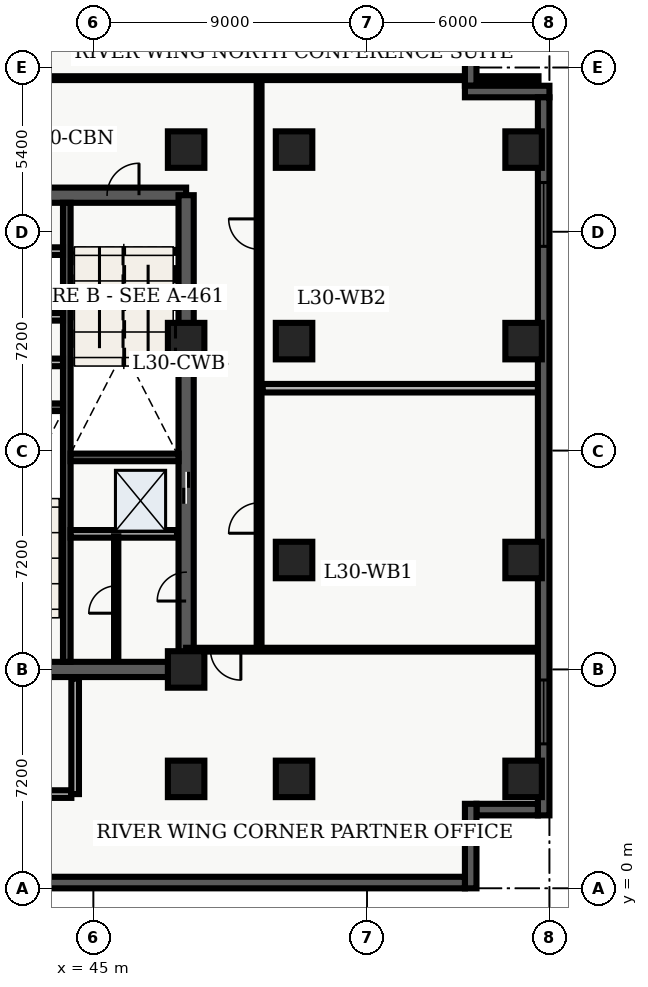
"""IFC4 building model, lengths in metres.
Left out: names, types, materials, properties, quantities, classifications, styles, units other than length and angle.
Written with IfcOpenShell. Run it as: python <this file> out.ifc"""

import sys

from ifc_helpers import new_model, entity, si_unit, converted_unit, direction, frame, origin_with_axes, origin_2d_with_axis, place, context, subcontext, project, spatial, polyline, rectangle, outline, extrude, element, fill, save


model = new_model("IFC4")
c1 = context("Model", 3, precision=1e-05, world=origin_with_axes(), true_north=direction((0.0, 1.0)))
c2 = subcontext(c1, "Body", "Model", "MODEL_VIEW")
j1 = project(units=[si_unit("LENGTHUNIT", "METRE"), converted_unit("PLANEANGLEUNIT", "DEGREE", entity("IfcPlaneAngleMeasure", 0.017), si_unit("PLANEANGLEUNIT", "RADIAN"), dimensions=[0, 0, 0, 0, 0, 0, 0])], contexts=[c1])
p1 = place(None, origin_with_axes())
s1 = spatial("IfcSite", under=j1, at=p1, CompositionType="ELEMENT")
p2 = place(p1, origin_with_axes())
s2 = spatial("IfcBuilding", under=s1, at=p2, CompositionType="ELEMENT")
p3 = place(p2, frame((0.0, 0.0, 124.2), z_axis=(0.0, 0.0, 1.0), x_axis=(1.0, 0.0, 0.0)))
s3 = spatial("IfcBuildingStorey", under=s2, at=p3, CompositionType="ELEMENT", Elevation=124.2)
p4 = place(p3, frame((40.2, 7.2, 0.0), z_axis=(0.0, 0.0, 1.0), x_axis=(1.0, 0.0, 0.0)))
e1 = element("IfcWall", 1, at=p4, inside=s3, PredefinedType="SHEAR", context=c2, shape_type="SweptSolid", body=[
    extrude(outline(polyline([(0.0, -0.25), (7.85, -0.25), (7.85, 0.25), (0.0, 0.25), (0.0, -0.25)])), origin_with_axes(), (0.0, 0.0, 1.0), 4.56),
])
p5 = place(p4, frame((2.175, 0.0, 0.0), z_axis=(0.0, 0.0, 1.0), x_axis=(1.0, 0.0, 0.0)))
e2 = element("IfcOpeningElement", 2, at=p5, cuts=e1, PredefinedType="OPENING", context=c2, shape_type="SweptSolid", body=[
    extrude(rectangle(XDim=1.05, YDim=0.52, at=origin_2d_with_axis()), origin_with_axes(), (0.0, 0.0, 1.0), 2.15),
])
p6 = place(p3, frame((40.2, 22.8, 0.0), z_axis=(0.0, 0.0, 1.0), x_axis=(1.0, 0.0, 0.0)))
e3 = element("IfcWall", 3, at=p6, inside=s3, PredefinedType="SHEAR", context=c2, shape_type="SweptSolid", body=[
    extrude(outline(polyline([(0.0, -0.25), (7.85, -0.25), (7.85, 0.25), (0.0, 0.25), (0.0, -0.25)])), origin_with_axes(), (0.0, 0.0, 1.0), 4.56),
])
p7 = place(p6, frame((5.775, 0.0, 0.0), z_axis=(0.0, 0.0, 1.0), x_axis=(1.0, 0.0, 0.0)))
e4 = element("IfcOpeningElement", 4, at=p7, cuts=e3, PredefinedType="OPENING", context=c2, shape_type="SweptSolid", body=[
    extrude(rectangle(XDim=1.05, YDim=0.52, at=origin_2d_with_axis()), origin_with_axes(), (0.0, 0.0, 1.0), 2.15),
])
p8 = place(p3, frame((48.05, 7.2, 0.0), z_axis=(0.0, 0.0, 1.0), x_axis=(0.0, 1.0, 0.0)))
e5 = element("IfcWall", 5, at=p8, inside=s3, PredefinedType="SHEAR", context=c2, shape_type="SweptSolid", body=[
    extrude(outline(polyline([(0.0, -0.25), (15.6, -0.25), (15.6, 0.25), (0.0, 0.25), (0.0, -0.25)])), origin_with_axes(), (0.0, 0.0, 1.0), 4.56),
])
p9 = place(p8, frame((5.975, 0.0, 0.0), z_axis=(0.0, 0.0, 1.0), x_axis=(1.0, 0.0, 0.0)))
e6 = element("IfcOpeningElement", 6, at=p9, cuts=e5, PredefinedType="OPENING", context=c2, shape_type="SweptSolid", body=[
    extrude(rectangle(XDim=1.05, YDim=0.52, at=origin_2d_with_axis()), origin_with_axes(), (0.0, 0.0, 1.0), 2.15),
])
p10 = place(p8, frame((2.725, 0.0, 0.0), z_axis=(0.0, 0.0, 1.0), x_axis=(1.0, 0.0, 0.0)))
e7 = element("IfcOpeningElement", 7, at=p10, cuts=e5, PredefinedType="OPENING", context=c2, shape_type="SweptSolid", body=[
    extrude(rectangle(XDim=0.95, YDim=0.52, at=origin_2d_with_axis()), origin_with_axes(), (0.0, 0.0, 1.0), 2.15),
])
p11 = place(p3, frame((44.125, 7.45, 0.0), z_axis=(0.0, 0.0, 1.0), x_axis=(0.0, 1.0, 0.0)))
e8 = element("IfcWall", 8, at=p11, inside=s3, PredefinedType="SHEAR", context=c2, shape_type="SweptSolid", body=[
    extrude(outline(polyline([(0.0, -0.125), (15.1, -0.125), (15.1, 0.125), (0.0, 0.125), (0.0, -0.125)])), origin_with_axes(), (0.0, 0.0, 1.0), 4.56),
])
for number, where, z_axis, x_axis in (
    (9, (40.45, 15.825, 0.0), (0.0, 0.0, 1.0), (1.0, 0.0, 0.0)),
    (10, (44.25, 14.175, 0.0), (0.0, 0.0, 1.0), (1.0, 0.0, 0.0)),
):
    element("IfcWall", number, at=place(p3, frame(where, z_axis=z_axis, x_axis=x_axis)), inside=s3, PredefinedType="SHEAR", context=c2, shape_type="SweptSolid", body=[
        extrude(outline(polyline([(0.0, -0.125), (3.55, -0.125), (3.55, 0.125), (0.0, 0.125), (0.0, -0.125)])), origin_with_axes(), (0.0, 0.0, 1.0), 4.56),
    ])
p12 = place(p3, frame((40.5, 17.3, 0.0), z_axis=(0.0, 0.0, 1.0), x_axis=(1.0, 0.0, 0.0)))
e11 = element("IfcWall", 11, at=p12, inside=s3, PredefinedType="SOLIDWALL", context=c2, shape_type="SweptSolid", body=[
    extrude(outline(polyline([(0.0, -0.125), (3.5, -0.125), (3.5, 0.125), (0.0, 0.125), (0.0, -0.125)])), origin_with_axes(), (0.0, 0.0, 1.0), 3.6),
])
p13 = place(p12, frame((2.4, 0.0, 0.0), z_axis=(0.0, 0.0, 1.0), x_axis=(1.0, 0.0, 0.0)))
e12 = element("IfcOpeningElement", 12, at=p13, cuts=e11, PredefinedType="OPENING", context=c2, shape_type="SweptSolid", body=[
    extrude(rectangle(XDim=0.9, YDim=0.27, at=origin_2d_with_axis()), origin_with_axes(), (0.0, 0.0, 1.0), 2.15),
])
p14 = place(p3, frame((40.5, 18.8, 0.0), z_axis=(0.0, 0.0, 1.0), x_axis=(1.0, 0.0, 0.0)))
e13 = element("IfcWall", 13, at=p14, inside=s3, PredefinedType="SOLIDWALL", context=c2, shape_type="SweptSolid", body=[
    extrude(outline(polyline([(0.0, -0.125), (3.5, -0.125), (3.5, 0.125), (0.0, 0.125), (0.0, -0.125)])), origin_with_axes(), (0.0, 0.0, 1.0), 3.6),
])
p15 = place(p3, frame((40.325, 3.1, 0.0), z_axis=(0.0, 0.0, 1.0), x_axis=(1.0, 0.0, 0.0)))
e14 = element("IfcWall", 14, at=p15, inside=s3, PredefinedType="SOLIDWALL", context=c2, shape_type="SweptSolid", body=[
    extrude(outline(polyline([(0.0, -0.125), (3.95, -0.125), (3.95, 0.125), (0.0, 0.125), (0.0, -0.125)])), origin_with_axes(), (0.0, 0.0, 1.0), 3.6),
])
p16 = place(p3, frame((44.4, 3.1, 0.0), z_axis=(0.0, 0.0, 1.0), x_axis=(0.0, 1.0, 0.0)))
e15 = element("IfcWall", 15, at=p16, inside=s3, PredefinedType="SOLIDWALL", context=c2, shape_type="SweptSolid", body=[
    extrude(outline(polyline([(0.0, -0.125), (3.8, -0.125), (3.8, 0.125), (0.0, 0.125), (0.0, -0.125)])), origin_with_axes(), (0.0, 0.0, 1.0), 3.6),
])
for number, where, z_axis, x_axis in (
    (16, (48.05, 3.6, 0.0), (0.0, 0.0, 1.0), (1.0, 0.0, 0.0)),
    (17, (48.05, 7.2, 0.0), (0.0, 0.0, 1.0), (1.0, 0.0, 0.0)),
    (18, (48.05, 18.0, 0.0), (0.0, 0.0, 1.0), (1.0, 0.0, 0.0)),
    (19, (48.05, 24.3, 0.0), (0.0, 0.0, 1.0), (1.0, 0.0, 0.0)),
    (20, (51.6, 3.6, 0.0), (0.0, 0.0, 1.0), (1.0, 0.0, 0.0)),
    (21, (51.6, 10.8, 0.0), (0.0, 0.0, 1.0), (1.0, 0.0, 0.0)),
    (22, (51.6, 18.0, 0.0), (0.0, 0.0, 1.0), (1.0, 0.0, 0.0)),
    (23, (51.6, 24.3, 0.0), (0.0, 0.0, 1.0), (1.0, 0.0, 0.0)),
    (24, (59.15, 3.6, 0.0), (0.0, 0.0, 1.0), (1.0, 0.0, 0.0)),
    (25, (59.15, 10.8, 0.0), (0.0, 0.0, 1.0), (1.0, 0.0, 0.0)),
    (26, (59.15, 18.0, 0.0), (0.0, 0.0, 1.0), (1.0, 0.0, 0.0)),
    (27, (59.15, 24.3, 0.0), (0.0, 0.0, 1.0), (1.0, 0.0, 0.0)),
):
    element("IfcColumn", number, at=place(p3, frame(where, z_axis=z_axis, x_axis=x_axis)), inside=s3, PredefinedType="COLUMN", context=c2, shape_type="SweptSolid", body=[
        extrude(rectangle(XDim=1.2, YDim=1.2, at=origin_2d_with_axis()), origin_with_axes(), (0.0, 0.0, 1.0), 4.8),
    ])
for number, where, z_axis, x_axis in (
    (28, (40.5, 20.96, 0.0), (0.0, 0.0, 1.0), (1.0, 0.0, 0.0)),
    (29, (44.25, 11.66, 0.0), (0.0, 0.0, 1.0), (1.0, 0.0, 0.0)),
):
    element("IfcWall", number, at=place(p3, frame(where, z_axis=z_axis, x_axis=x_axis)), inside=s3, PredefinedType="SOLIDWALL", context=c2, shape_type="SweptSolid", body=[
        extrude(outline(polyline([(0.0, -0.125), (3.5, -0.125), (3.5, 0.125), (0.0, 0.125), (0.0, -0.125)])), origin_with_axes(), (0.0, 0.0, 1.0), 3.2),
    ])
p17 = place(p3, frame((45.75, 7.5, 0.0), z_axis=(0.0, 0.0, 1.0), x_axis=(0.0, 1.0, 0.0)))
e30 = element("IfcWall", 30, at=p17, inside=s3, PredefinedType="PARTITIONING", context=c2, shape_type="SweptSolid", body=[
    extrude(outline(polyline([(0.0, -0.07), (4.08, -0.07), (4.08, 0.07), (0.0, 0.07), (0.0, -0.07)])), origin_with_axes(), (0.0, 0.0, 1.0), 3.2),
])
p18 = place(p17, frame((2.0, 0.0, 0.0), z_axis=(0.0, 0.0, 1.0), x_axis=(1.0, 0.0, 0.0)))
e31 = element("IfcOpeningElement", 31, at=p18, cuts=e30, PredefinedType="OPENING", context=c2, shape_type="SweptSolid", body=[
    extrude(rectangle(XDim=0.9, YDim=0.16, at=origin_2d_with_axis()), origin_with_axes(), (0.0, 0.0, 1.0), 2.15),
])
p19 = place(p3, frame((50.45, 7.85, 0.0), z_axis=(0.0, 0.0, 1.0), x_axis=(0.0, 1.0, 0.0)))
e32 = element("IfcWall", 32, at=p19, inside=s3, PredefinedType="PARTITIONING", context=c2, shape_type="SweptSolid", body=[
    extrude(outline(polyline([(0.0, -0.08), (18.8, -0.08), (18.8, 0.08), (0.0, 0.08), (0.0, -0.08)])), origin_with_axes(), (0.0, 0.0, 1.0), 3.2),
])
p20 = place(p19, frame((4.33, 0.0, 0.0), z_axis=(0.0, 0.0, 1.0), x_axis=(1.0, 0.0, 0.0)))
e33 = element("IfcOpeningElement", 33, at=p20, cuts=e32, PredefinedType="OPENING", context=c2, shape_type="SweptSolid", body=[
    extrude(rectangle(XDim=1.0, YDim=0.18, at=origin_2d_with_axis()), origin_with_axes(), (0.0, 0.0, 1.0), 2.15),
])
p21 = place(p19, frame((13.671, 0.0, 0.0), z_axis=(0.0, 0.0, 1.0), x_axis=(1.0, 0.0, 0.0)))
e34 = element("IfcOpeningElement", 34, at=p21, cuts=e32, PredefinedType="OPENING", context=c2, shape_type="SweptSolid", body=[
    extrude(rectangle(XDim=1.0, YDim=0.18, at=origin_2d_with_axis()), origin_with_axes(), (0.0, 0.0, 1.0), 2.15),
])
p22 = place(p3, frame((59.64, 7.85, 0.0), z_axis=(0.0, 0.0, 1.0), x_axis=(-1.0, 0.0, 0.0)))
e35 = element("IfcWall", 35, at=p22, inside=s3, PredefinedType="PARTITIONING", context=c2, shape_type="SweptSolid", body=[
    extrude(outline(polyline([(0.0, -0.062), (11.59, -0.062), (11.59, 0.062), (0.0, 0.062), (0.0, -0.062)])), origin_with_axes(), (0.0, 0.0, 1.0), 3.2),
])
p23 = place(p22, frame((10.29, 0.0, 0.0), z_axis=(0.0, 0.0, 1.0), x_axis=(1.0, 0.0, 0.0)))
e36 = element("IfcOpeningElement", 36, at=p23, cuts=e35, PredefinedType="OPENING", context=c2, shape_type="SweptSolid", body=[
    extrude(rectangle(XDim=1.0, YDim=0.145, at=origin_2d_with_axis()), origin_with_axes(), (0.0, 0.0, 1.0), 2.15),
])
p24 = place(p3, frame((38.76, 26.65, 0.0), z_axis=(0.0, 0.0, 1.0), x_axis=(1.0, 0.0, 0.0)))
e37 = element("IfcWall", 37, at=p24, inside=s3, PredefinedType="PARTITIONING", context=c2, shape_type="SweptSolid", body=[
    extrude(outline(polyline([(0.0, -0.062), (20.88, -0.062), (20.88, 0.062), (0.0, 0.062), (0.0, -0.062)])), origin_with_axes(), (0.0, 0.0, 1.0), 3.2),
])
p25 = place(p24, frame((4.24, 0.0, 0.0), z_axis=(0.0, 0.0, 1.0), x_axis=(1.0, 0.0, 0.0)))
e38 = element("IfcOpeningElement", 38, at=p25, cuts=e37, PredefinedType="OPENING", context=c2, shape_type="SweptSolid", body=[
    extrude(rectangle(XDim=1.0, YDim=0.145, at=origin_2d_with_axis()), origin_with_axes(), (0.0, 0.0, 1.0), 2.15),
])
p26 = place(p3, frame((50.57, 16.451, 0.0), z_axis=(0.0, 0.0, 1.0), x_axis=(1.0, 0.0, 0.0)))
e39 = element("IfcWall", 39, at=p26, inside=s3, PredefinedType="PARTITIONING", context=c2, shape_type="SweptSolid", body=[
    extrude(outline(polyline([(0.0, -0.14), (9.055, -0.14), (9.055, 0.14), (0.0, 0.14), (0.0, -0.14)])), origin_with_axes(), (0.0, 0.0, 1.0), 3.2),
])
p27 = place(p3, frame((57.41, 28.42, 0.0), z_axis=(0.0, 0.0, 1.0), x_axis=(0.0, -1.0, 0.0)))
e40 = element("IfcWall", 40, at=p27, inside=s3, PredefinedType="SOLIDWALL", context=c2, shape_type="SweptSolid", body=[
    extrude(outline(polyline([(0.0, -0.19), (2.02, -0.19), (2.02, 0.19), (0.0, 0.19), (0.0, -0.19)])), origin_with_axes(), (0.0, 0.0, 1.0), 4.56),
])
p28 = place(p3, frame((57.22, 26.21, 0.0), z_axis=(0.0, 0.0, 1.0), x_axis=(1.0, 0.0, 0.0)))
e41 = element("IfcWall", 41, at=p28, inside=s3, PredefinedType="SOLIDWALL", context=c2, shape_type="SweptSolid", body=[
    extrude(outline(polyline([(0.0, -0.19), (2.78, -0.19), (2.78, 0.19), (0.0, 0.19), (0.0, -0.19)])), origin_with_axes(), (0.0, 0.0, 1.0), 4.56),
])
p29 = place(p3, frame((59.81, 26.02, 0.0), z_axis=(0.0, 0.0, 1.0), x_axis=(0.0, -1.0, 0.0)))
e42 = element("IfcWall", 42, at=p29, inside=s3, PredefinedType="SOLIDWALL", context=c2, shape_type="SweptSolid", body=[
    extrude(outline(polyline([(0.0, -0.19), (23.62, -0.19), (23.62, 0.19), (0.0, 0.19), (0.0, -0.19)])), origin_with_axes(), (0.0, 0.0, 1.0), 4.56),
])
p30 = place(p29, frame((3.853, 0.0, 0.45), z_axis=(0.0, 0.0, 1.0), x_axis=(1.0, 0.0, 0.0)))
e43 = element("IfcOpeningElement", 43, at=p30, cuts=e42, PredefinedType="OPENING", context=c2, shape_type="SweptSolid", body=[
    extrude(rectangle(XDim=2.1, YDim=0.4, at=origin_2d_with_axis()), origin_with_axes(), (0.0, 0.0, 1.0), 2.2),
])
p31 = place(p29, frame((20.218, 0.0, 0.45), z_axis=(0.0, 0.0, 1.0), x_axis=(1.0, 0.0, 0.0)))
e44 = element("IfcOpeningElement", 44, at=p31, cuts=e42, PredefinedType="OPENING", context=c2, shape_type="SweptSolid", body=[
    extrude(rectangle(XDim=2.1, YDim=0.4, at=origin_2d_with_axis()), origin_with_axes(), (0.0, 0.0, 1.0), 2.2),
])
p32 = place(p3, frame((59.62, 2.59, 0.0), z_axis=(0.0, 0.0, 1.0), x_axis=(-1.0, 0.0, 0.0)))
e45 = element("IfcWall", 45, at=p32, inside=s3, PredefinedType="SOLIDWALL", context=c2, shape_type="SweptSolid", body=[
    extrude(outline(polyline([(0.0, -0.19), (2.02, -0.19), (2.02, 0.19), (0.0, 0.19), (0.0, -0.19)])), origin_with_axes(), (0.0, 0.0, 1.0), 4.56),
])
p33 = place(p3, frame((57.41, 2.78, 0.0), z_axis=(0.0, 0.0, 1.0), x_axis=(0.0, -1.0, 0.0)))
e46 = element("IfcWall", 46, at=p33, inside=s3, PredefinedType="SOLIDWALL", context=c2, shape_type="SweptSolid", body=[
    extrude(outline(polyline([(0.0, -0.19), (2.78, -0.19), (2.78, 0.19), (0.0, 0.19), (0.0, -0.19)])), origin_with_axes(), (0.0, 0.0, 1.0), 4.56),
])
p34 = place(p3, frame((57.22, 0.19, 0.0), z_axis=(0.0, 0.0, 1.0), x_axis=(-1.0, 0.0, 0.0)))
e47 = element("IfcWall", 47, at=p34, inside=s3, PredefinedType="SOLIDWALL", context=c2, shape_type="SweptSolid", body=[
    extrude(outline(polyline([(0.0, -0.19), (54.82, -0.19), (54.82, 0.19), (0.0, 0.19), (0.0, -0.19)])), origin_with_axes(), (0.0, 0.0, 1.0), 4.56),
])
p35 = place(p8, frame((5.975, 0.0, 0.0), z_axis=(0.0, 0.0, 1.0), x_axis=(1.0, 0.0, 0.0)))
e48 = element("IfcDoor", 48, at=p35, inside=s3, OperationType="SLIDING_TO_LEFT", PredefinedType="DOOR", context=c2, shape_type="SweptSolid", body=[
    extrude(rectangle(XDim=1.05, YDim=0.09, at=origin_2d_with_axis()), origin_with_axes(), (0.0, 0.0, 1.0), 2.15),
])
fill(e6, e48)
p36 = place(p6, frame((5.775, 0.0, 0.0), z_axis=(0.0, 0.0, 1.0), x_axis=(1.0, 0.0, 0.0)))
e49 = element("IfcDoor", 49, at=p36, inside=s3, OperationType="SINGLE_SWING_RIGHT", PredefinedType="DOOR", context=c2, shape_type="SweptSolid", body=[
    extrude(rectangle(XDim=1.05, YDim=0.09, at=origin_2d_with_axis()), origin_with_axes(), (0.0, 0.0, 1.0), 2.15),
])
fill(e4, e49)
p37 = place(p17, frame((2.0, 0.0, 0.0), z_axis=(0.0, 0.0, 1.0), x_axis=(1.0, 0.0, 0.0)))
e50 = element("IfcDoor", 50, at=p37, inside=s3, OperationType="SINGLE_SWING_LEFT", PredefinedType="DOOR", context=c2, shape_type="SweptSolid", body=[
    extrude(rectangle(XDim=0.9, YDim=0.084, at=origin_2d_with_axis()), origin_with_axes(), (0.0, 0.0, 1.0), 2.15),
])
fill(e31, e50)
p38 = place(p8, frame((2.725, 0.0, 0.0), z_axis=(0.0, 0.0, 1.0), x_axis=(1.0, 0.0, 0.0)))
e51 = element("IfcDoor", 51, at=p38, inside=s3, OperationType="SINGLE_SWING_LEFT", PredefinedType="DOOR", context=c2, shape_type="SweptSolid", body=[
    extrude(rectangle(XDim=0.95, YDim=0.09, at=origin_2d_with_axis()), origin_with_axes(), (0.0, 0.0, 1.0), 2.15),
])
fill(e7, e51)
p39 = place(p22, frame((10.29, 0.0, 0.0), z_axis=(0.0, 0.0, 1.0), x_axis=(1.0, 0.0, 0.0)))
e52 = element("IfcDoor", 52, at=p39, inside=s3, OperationType="SINGLE_SWING_LEFT", PredefinedType="DOOR", context=c2, shape_type="SweptSolid", body=[
    extrude(rectangle(XDim=1.0, YDim=0.075, at=origin_2d_with_axis()), origin_with_axes(), (0.0, 0.0, 1.0), 2.15),
])
fill(e36, e52)
p40 = place(p19, frame((4.33, 0.0, 0.0), z_axis=(0.0, 0.0, 1.0), x_axis=(1.0, 0.0, 0.0)))
e53 = element("IfcDoor", 53, at=p40, inside=s3, OperationType="SINGLE_SWING_LEFT", PredefinedType="DOOR", context=c2, shape_type="SweptSolid", body=[
    extrude(rectangle(XDim=1.0, YDim=0.09, at=origin_2d_with_axis()), origin_with_axes(), (0.0, 0.0, 1.0), 2.15),
])
fill(e33, e53)
p41 = place(p19, frame((13.671, 0.0, 0.0), z_axis=(0.0, 0.0, 1.0), x_axis=(1.0, 0.0, 0.0)))
e54 = element("IfcDoor", 54, at=p41, inside=s3, OperationType="SINGLE_SWING_RIGHT", PredefinedType="DOOR", context=c2, shape_type="SweptSolid", body=[
    extrude(rectangle(XDim=1.0, YDim=0.09, at=origin_2d_with_axis()), origin_with_axes(), (0.0, 0.0, 1.0), 2.15),
])
fill(e34, e54)
p42 = place(p29, frame((3.853, 0.0, 0.45), z_axis=(0.0, 0.0, 1.0), x_axis=(1.0, 0.0, 0.0)))
e55 = element("IfcWindow", 55, at=p42, inside=s3, PredefinedType="WINDOW", context=c2, shape_type="SweptSolid", body=[
    extrude(rectangle(XDim=2.1, YDim=0.09, at=origin_2d_with_axis()), origin_with_axes(), (0.0, 0.0, 1.0), 2.2),
])
fill(e43, e55)
p43 = place(p29, frame((20.218, 0.0, 0.45), z_axis=(0.0, 0.0, 1.0), x_axis=(1.0, 0.0, 0.0)))
e56 = element("IfcWindow", 56, at=p43, inside=s3, PredefinedType="WINDOW", context=c2, shape_type="SweptSolid", body=[
    extrude(rectangle(XDim=2.1, YDim=0.09, at=origin_2d_with_axis()), origin_with_axes(), (0.0, 0.0, 1.0), 2.2),
])
fill(e44, e56)
save(model, sys.argv[1])
